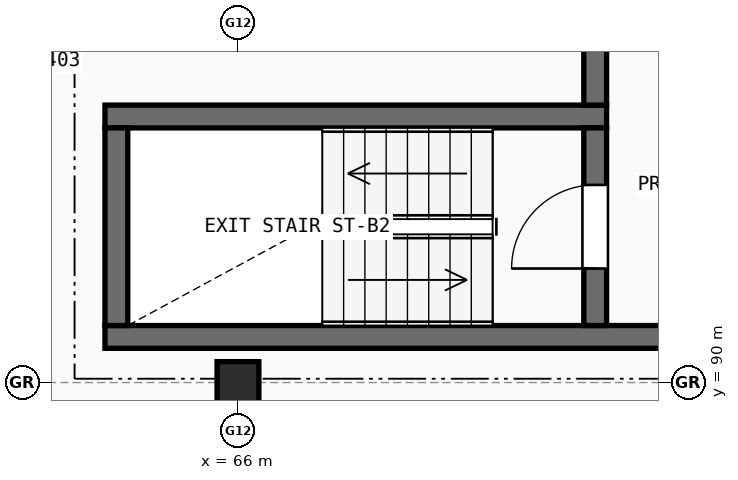
"""IFC4 building model, lengths in metres.
Left out: names, types, materials, properties, quantities, classifications, styles, units other than length and angle.
Written with IfcOpenShell. Run it as: python <this file> out.ifc"""

import sys

from ifc_helpers import new_model, si_unit, direction, frame, frame_2d, origin, origin_2d, place, context, subcontext, project, spatial, rectangle, extrude, element, fill, save


model = new_model("IFC4")
c1 = context("Model", 3, precision=1e-05, world=origin(), true_north=direction((0.0, 1.0)))
c2 = subcontext(c1, "Body", "Model", "MODEL_VIEW")
j1 = project(units=[si_unit("LENGTHUNIT", "METRE"), si_unit("PLANEANGLEUNIT", "RADIAN")], contexts=[c1])
p1 = place(None, origin())
s1 = spatial("IfcSite", under=j1, at=p1, CompositionType="ELEMENT")
p2 = place(p1, origin())
s2 = spatial("IfcBuilding", under=s1, at=p2, CompositionType="ELEMENT")
p3 = place(p2, frame((0.0, 0.0, 23.7)))
s3 = spatial("IfcBuildingStorey", under=s2, at=p3, CompositionType="ELEMENT", Elevation=23.7)
p4 = place(p3, frame((66.0, 90.0, 0.0), z_axis=(0.0, 0.0, 1.0), x_axis=(1.0, 0.0, 0.0)))
e1 = element("IfcColumn", 1, at=p4, inside=s3, PredefinedType="COLUMN", context=c2, shape_type="SweptSolid", body=[
    extrude(rectangle(XDim=0.55, YDim=0.55, at=origin_2d()), origin(), (0.0, 0.0, 1.0), 2.975),
])
p5 = place(p3, frame((64.25, 90.6, 0.0), z_axis=(0.0, 0.0, 1.0), x_axis=(1.0, 0.0, 0.0)))
e2 = element("IfcWall", 2, at=p5, inside=s3, PredefinedType="SHEAR", context=c2, shape_type="SweptSolid", body=[
    extrude(rectangle(XDim=11.35, YDim=0.3, at=frame_2d((5.675, 0.0))), origin(), (0.0, 0.0, 1.0), 2.975),
])
p6 = place(p5, frame((8.1, 0.0, 0.0)))
e3 = element("IfcOpeningElement", 3, at=p6, cuts=e2, PredefinedType="OPENING", context=c2, shape_type="SweptSolid", body=[
    extrude(rectangle(XDim=1.2, YDim=2.15, at=frame_2d((0.6, 1.075))), frame((0.0, 0.16, 0.0), z_axis=(0.0, -1.0, 0.0), x_axis=(1.0, 0.0, 0.0)), (0.0, 0.0, 1.0), 0.32),
])
p7 = place(p3, frame((70.85, 93.5, 0.0), z_axis=(0.0, 0.0, 1.0), x_axis=(-1.0, 0.0, 0.0)))
e4 = element("IfcWall", 4, at=p7, inside=s3, PredefinedType="SHEAR", context=c2, shape_type="SweptSolid", body=[
    extrude(rectangle(XDim=6.6, YDim=0.3, at=frame_2d((3.3, 0.0))), origin(), (0.0, 0.0, 1.0), 2.975),
])
p8 = place(p3, frame((64.4, 93.35, 0.0), z_axis=(0.0, 0.0, 1.0), x_axis=(0.0, -1.0, 0.0)))
e5 = element("IfcWall", 5, at=p8, inside=s3, PredefinedType="SHEAR", context=c2, shape_type="SweptSolid", body=[
    extrude(rectangle(XDim=2.6, YDim=0.3, at=frame_2d((1.3, 0.0))), origin(), (0.0, 0.0, 1.0), 2.975),
])
p9 = place(p3, frame((70.7, 90.75, 0.0), z_axis=(0.0, 0.0, 1.0), x_axis=(0.0, 1.0, 0.0)))
e6 = element("IfcWall", 6, at=p9, inside=s3, PredefinedType="SHEAR", context=c2, shape_type="SweptSolid", body=[
    extrude(rectangle(XDim=2.6, YDim=0.3, at=frame_2d((1.3, 0.0))), origin(), (0.0, 0.0, 1.0), 2.975),
])
p10 = place(p9, frame((0.75, 0.0, 0.0)))
e7 = element("IfcOpeningElement", 7, at=p10, cuts=e6, PredefinedType="OPENING", context=c2, shape_type="SweptSolid", body=[
    extrude(rectangle(XDim=1.1, YDim=2.15, at=frame_2d((0.55, 1.075))), frame((0.0, 0.16, 0.0), z_axis=(0.0, -1.0, 0.0), x_axis=(1.0, 0.0, 0.0)), (0.0, 0.0, 1.0), 0.32),
])
p11 = place(p3, frame((70.7, 93.65, 0.0), z_axis=(0.0, 0.0, 1.0), x_axis=(0.0, 1.0, 0.0)))
e8 = element("IfcWall", 8, at=p11, inside=s3, PredefinedType="SHEAR", context=c2, shape_type="SweptSolid", body=[
    extrude(rectangle(XDim=3.55, YDim=0.3, at=frame_2d((1.775, 0.0))), origin(), (0.0, 0.0, 1.0), 2.975),
])
p12 = place(p10, origin())
e9 = element("IfcDoor", 9, at=p12, inside=s3, OperationType="SINGLE_SWING_LEFT", PredefinedType="DOOR", context=c2, shape_type="SweptSolid", body=[
    extrude(rectangle(XDim=1.1, YDim=2.15, at=frame_2d((0.55, 1.075))), frame((0.0, 0.025, 0.0), z_axis=(0.0, -1.0, 0.0), x_axis=(1.0, 0.0, 0.0)), (0.0, 0.0, 1.0), 0.05),
])
fill(e7, e9)
save(model, sys.argv[1])
